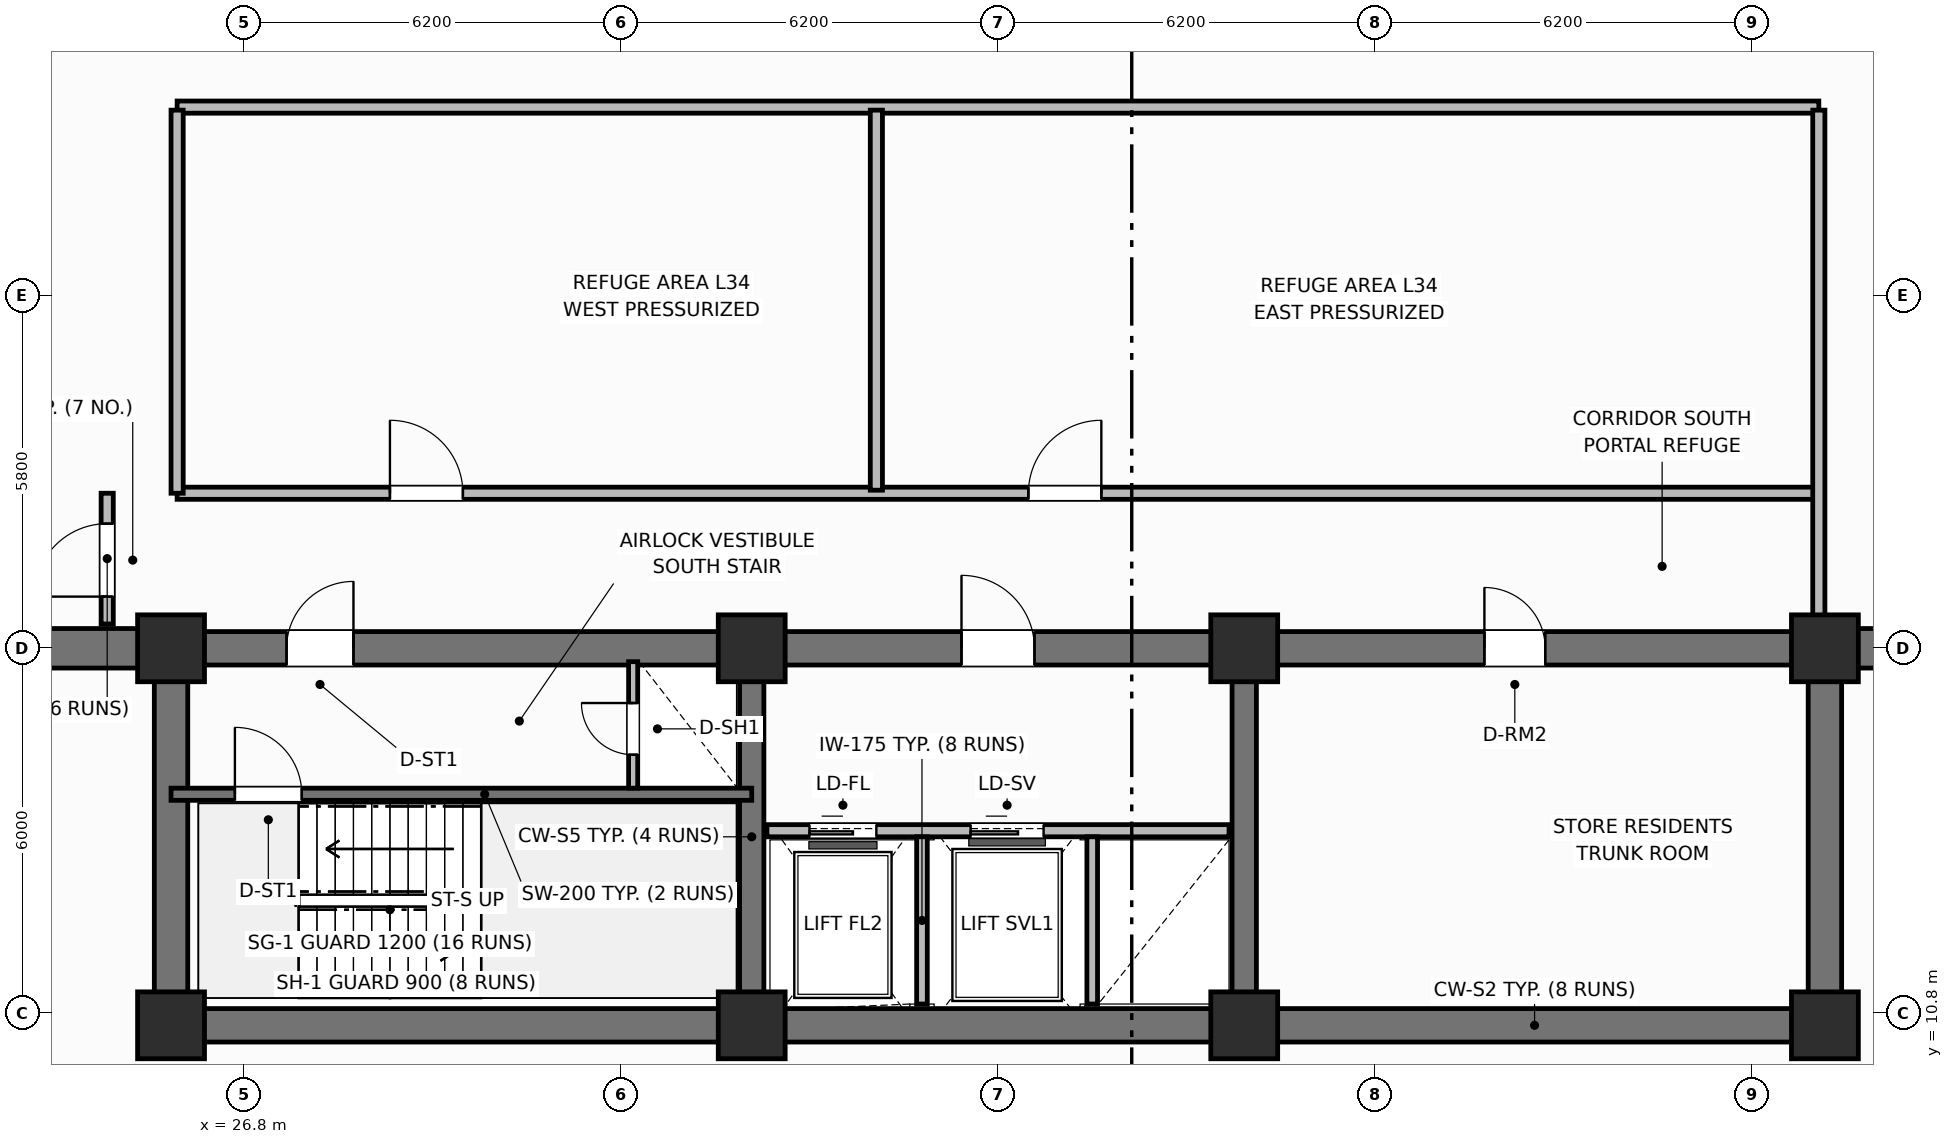
"""IFC4 building model, lengths in metres.
Left out: names, types, materials, properties, quantities, classifications, styles, units other than length and angle.
Written with IfcOpenShell. Run it as: python <this file> out.ifc"""

import sys

from ifc_helpers import new_model, si_unit, direction, frame, frame_2d, origin, origin_2d, place, context, subcontext, project, spatial, rectangle, extrude, element, fill, save


model = new_model("IFC4")
c1 = context("Model", 3, precision=1e-05, world=origin(), true_north=direction((0.0, 1.0)))
c2 = subcontext(c1, "Body", "Model", "MODEL_VIEW")
j1 = project(units=[si_unit("LENGTHUNIT", "METRE"), si_unit("PLANEANGLEUNIT", "RADIAN")], contexts=[c1])
p1 = place(None, origin())
s1 = spatial("IfcSite", under=j1, at=p1, CompositionType="ELEMENT")
p2 = place(p1, origin())
s2 = spatial("IfcBuilding", under=s1, at=p2, CompositionType="ELEMENT")
p3 = place(p2, frame((0.0, 0.0, 136.4)))
s3 = spatial("IfcBuildingStorey", under=s2, at=p3, CompositionType="ELEMENT", Elevation=136.4)
p4 = place(p3, frame((52.8, 10.6, 0.0), z_axis=(0.0, 0.0, 1.0), x_axis=(-1.0, 0.0, 0.0)))
e1 = element("IfcWall", 1, at=p4, inside=s3, PredefinedType="SHEAR", context=c2, shape_type="SweptSolid", body=[
    extrude(rectangle(XDim=27.2, YDim=0.55, at=frame_2d((13.6, 0.0))), origin(), (0.0, 0.0, 1.0), 7.2),
])
for number, where, z_axis, x_axis in (
    (2, (25.6, 10.875, 0.0), (0.0, 0.0, 1.0), (0.0, 1.0, 0.0)),
    (3, (52.8, 10.875, 0.0), (0.0, 0.0, 1.0), (0.0, 1.0, 0.0)),
):
    element("IfcWall", number, at=place(p3, frame(where, z_axis=z_axis, x_axis=x_axis)), inside=s3, PredefinedType="SHEAR", context=c2, shape_type="SweptSolid", body=[
        extrude(rectangle(XDim=5.65, YDim=0.55, at=frame_2d((2.825, 0.0))), origin(), (0.0, 0.0, 1.0), 7.2),
    ])
p5 = place(p3, frame((25.6, 16.8, 0.0), z_axis=(0.0, 0.0, 1.0), x_axis=(1.0, 0.0, 0.0)))
e4 = element("IfcWall", 4, at=p5, inside=s3, PredefinedType="SHEAR", context=c2, shape_type="SweptSolid", body=[
    extrude(rectangle(XDim=27.2, YDim=0.55, at=frame_2d((13.6, 0.0))), origin(), (0.0, 0.0, 1.0), 7.2),
])
p6 = place(p5, frame((1.9, 0.0, 0.0)))
e5 = element("IfcOpeningElement", 5, at=p6, cuts=e4, PredefinedType="OPENING", context=c2, shape_type="SweptSolid", body=[
    extrude(rectangle(XDim=1.1, YDim=2.15, at=frame_2d((0.55, 1.075))), frame((0.0, 0.285, 0.0), z_axis=(0.0, -1.0, 0.0), x_axis=(1.0, 0.0, 0.0)), (0.0, 0.0, 1.0), 0.57),
])
p7 = place(p5, frame((13.0, 0.0, 0.0)))
e6 = element("IfcOpeningElement", 6, at=p7, cuts=e4, PredefinedType="OPENING", context=c2, shape_type="SweptSolid", body=[
    extrude(rectangle(XDim=1.2, YDim=2.15, at=frame_2d((0.6, 1.075))), frame((0.0, 0.285, 0.0), z_axis=(0.0, -1.0, 0.0), x_axis=(1.0, 0.0, 0.0)), (0.0, 0.0, 1.0), 0.57),
])
p8 = place(p5, frame((21.6, 0.0, 0.0)))
e7 = element("IfcOpeningElement", 7, at=p8, cuts=e4, PredefinedType="OPENING", context=c2, shape_type="SweptSolid", body=[
    extrude(rectangle(XDim=1.0, YDim=2.15, at=frame_2d((0.5, 1.075))), frame((0.0, 0.285, 0.0), z_axis=(0.0, -1.0, 0.0), x_axis=(1.0, 0.0, 0.0)), (0.0, 0.0, 1.0), 0.57),
])
for number, where, z_axis, x_axis in (
    (8, (35.15, 10.875, 0.0), (0.0, 0.0, 1.0), (0.0, 1.0, 0.0)),
    (9, (43.25, 10.875, 0.0), (0.0, 0.0, 1.0), (0.0, 1.0, 0.0)),
):
    element("IfcWall", number, at=place(p3, frame(where, z_axis=z_axis, x_axis=x_axis)), inside=s3, PredefinedType="SHEAR", context=c2, shape_type="SweptSolid", body=[
        extrude(rectangle(XDim=5.65, YDim=0.4, at=frame_2d((2.825, 0.0))), origin(), (0.0, 0.0, 1.0), 7.2),
    ])
for number, where, z_axis, x_axis in (
    (10, (25.6, 10.6, 0.0), (0.0, 0.0, 1.0), (1.0, 0.0, 0.0)),
    (11, (25.6, 16.8, 0.0), (0.0, 0.0, 1.0), (1.0, 0.0, 0.0)),
    (12, (35.15, 10.6, 0.0), (0.0, 0.0, 1.0), (1.0, 0.0, 0.0)),
    (13, (35.15, 16.8, 0.0), (0.0, 0.0, 1.0), (1.0, 0.0, 0.0)),
    (14, (43.25, 10.6, 0.0), (0.0, 0.0, 1.0), (1.0, 0.0, 0.0)),
    (15, (43.25, 16.8, 0.0), (0.0, 0.0, 1.0), (1.0, 0.0, 0.0)),
    (16, (52.8, 10.6, 0.0), (0.0, 0.0, 1.0), (1.0, 0.0, 0.0)),
    (17, (52.8, 16.8, 0.0), (0.0, 0.0, 1.0), (1.0, 0.0, 0.0)),
):
    element("IfcColumn", number, at=place(p3, frame(where, z_axis=z_axis, x_axis=x_axis)), inside=s3, PredefinedType="COLUMN", context=c2, shape_type="SweptSolid", body=[
        extrude(rectangle(XDim=1.1, YDim=1.1, at=origin_2d()), origin(), (0.0, 0.0, 1.0), 7.2),
    ])
for number, where, z_axis, x_axis in (
    (18, (15.05, 16.8, 0.0), (0.0, 0.0, 1.0), (1.0, 0.0, 0.0)),
    (19, (52.8, 16.8, 0.0), (0.0, 0.0, 1.0), (1.0, 0.0, 0.0)),
):
    element("IfcWall", number, at=place(p3, frame(where, z_axis=z_axis, x_axis=x_axis)), inside=s3, PredefinedType="SHEAR", context=c2, shape_type="SweptSolid", body=[
        extrude(rectangle(XDim=10.55, YDim=0.65, at=frame_2d((5.275, 0.0))), origin(), (0.0, 0.0, 1.0), 6.8),
    ])
p9 = place(p3, frame((25.6, 14.4, 0.0), z_axis=(0.0, 0.0, 1.0), x_axis=(1.0, 0.0, 0.0)))
e20 = element("IfcWall", 20, at=p9, inside=s3, PredefinedType="SHEAR", context=c2, shape_type="SweptSolid", body=[
    extrude(rectangle(XDim=9.55, YDim=0.2, at=frame_2d((4.775, 0.0))), origin(), (0.0, 0.0, 1.0), 7.2),
])
p10 = place(p9, frame((1.05, 0.0, 0.0)))
e21 = element("IfcOpeningElement", 21, at=p10, cuts=e20, PredefinedType="OPENING", context=c2, shape_type="SweptSolid", body=[
    extrude(rectangle(XDim=1.1, YDim=2.15, at=frame_2d((0.55, 1.075))), frame((0.0, 0.11, 0.0), z_axis=(0.0, -1.0, 0.0), x_axis=(1.0, 0.0, 0.0)), (0.0, 0.0, 1.0), 0.22),
])
p11 = place(p3, frame((33.2, 14.5, 0.0), z_axis=(0.0, 0.0, 1.0), x_axis=(0.0, 1.0, 0.0)))
e22 = element("IfcWall", 22, at=p11, inside=s3, PredefinedType="PARTITIONING", context=c2, shape_type="SweptSolid", body=[
    extrude(rectangle(XDim=2.08, YDim=0.15, at=frame_2d((1.04, 0.0))), origin(), (0.0, 0.0, 1.0), 4.96),
])
p12 = place(p11, frame((0.55, 0.0, 0.0)))
e23 = element("IfcOpeningElement", 23, at=p12, cuts=e22, PredefinedType="OPENING", context=c2, shape_type="SweptSolid", body=[
    extrude(rectangle(XDim=0.85, YDim=2.05, at=frame_2d((0.425, 1.025))), frame((0.0, 0.085, 0.0), z_axis=(0.0, -1.0, 0.0), x_axis=(1.0, 0.0, 0.0)), (0.0, 0.0, 1.0), 0.17),
])
p13 = place(p3, frame((35.4, 13.8, 0.0), z_axis=(0.0, 0.0, 1.0), x_axis=(1.0, 0.0, 0.0)))
e24 = element("IfcWall", 24, at=p13, inside=s3, PredefinedType="PARTITIONING", context=c2, shape_type="SweptSolid", body=[
    extrude(rectangle(XDim=7.6, YDim=0.2, at=frame_2d((3.8, 0.0))), origin(), (0.0, 0.0, 1.0), 4.96),
])
p14 = place(p13, frame((0.7, 0.0, 0.0)))
e25 = element("IfcOpeningElement", 25, at=p14, cuts=e24, PredefinedType="OPENING", context=c2, shape_type="SweptSolid", body=[
    extrude(rectangle(XDim=1.1, YDim=2.15, at=frame_2d((0.55, 1.075))), frame((0.0, 0.11, 0.0), z_axis=(0.0, -1.0, 0.0), x_axis=(1.0, 0.0, 0.0)), (0.0, 0.0, 1.0), 0.22),
])
p15 = place(p13, frame((3.35, 0.0, 0.0)))
e26 = element("IfcOpeningElement", 26, at=p15, cuts=e24, PredefinedType="OPENING", context=c2, shape_type="SweptSolid", body=[
    extrude(rectangle(XDim=1.2, YDim=2.15, at=frame_2d((0.6, 1.075))), frame((0.0, 0.11, 0.0), z_axis=(0.0, -1.0, 0.0), x_axis=(1.0, 0.0, 0.0)), (0.0, 0.0, 1.0), 0.22),
])
for number, where, z_axis, x_axis in (
    (27, (37.95, 10.95, 0.0), (0.0, 0.0, 1.0), (0.0, 1.0, 0.0)),
    (28, (40.75, 10.95, 0.0), (0.0, 0.0, 1.0), (0.0, 1.0, 0.0)),
):
    element("IfcWall", number, at=place(p3, frame(where, z_axis=z_axis, x_axis=x_axis)), inside=s3, PredefinedType="PARTITIONING", context=c2, shape_type="SweptSolid", body=[
        extrude(rectangle(XDim=2.75, YDim=0.175, at=frame_2d((1.375, 0.0))), origin(), (0.0, 0.0, 1.0), 4.96),
    ])
p16 = place(p3, frame((25.7, 19.35, 0.0), z_axis=(0.0, 0.0, 1.0), x_axis=(1.0, 0.0, 0.0)))
e29 = element("IfcWall", 29, at=p16, inside=s3, PredefinedType="PARTITIONING", context=c2, shape_type="SweptSolid", body=[
    extrude(rectangle(XDim=27.0, YDim=0.2, at=frame_2d((13.5, 0.0))), origin(), (0.0, 0.0, 1.0), 4.96),
])
p17 = place(p16, frame((3.5, 0.0, 0.0)))
e30 = element("IfcOpeningElement", 30, at=p17, cuts=e29, PredefinedType="OPENING", context=c2, shape_type="SweptSolid", body=[
    extrude(rectangle(XDim=1.2, YDim=2.15, at=frame_2d((0.6, 1.075))), frame((0.0, 0.11, 0.0), z_axis=(0.0, -1.0, 0.0), x_axis=(1.0, 0.0, 0.0)), (0.0, 0.0, 1.0), 0.22),
])
p18 = place(p16, frame((14.0, 0.0, 0.0)))
e31 = element("IfcOpeningElement", 31, at=p18, cuts=e29, PredefinedType="OPENING", context=c2, shape_type="SweptSolid", body=[
    extrude(rectangle(XDim=1.2, YDim=2.15, at=frame_2d((0.6, 1.075))), frame((0.0, 0.11, 0.0), z_axis=(0.0, -1.0, 0.0), x_axis=(1.0, 0.0, 0.0)), (0.0, 0.0, 1.0), 0.22),
])
p19 = place(p3, frame((25.7, 25.7, 0.0), z_axis=(0.0, 0.0, 1.0), x_axis=(1.0, 0.0, 0.0)))
e32 = element("IfcWall", 32, at=p19, inside=s3, PredefinedType="PARTITIONING", context=c2, shape_type="SweptSolid", body=[
    extrude(rectangle(XDim=27.0, YDim=0.2, at=frame_2d((13.5, 0.0))), origin(), (0.0, 0.0, 1.0), 4.96),
])
p20 = place(p3, frame((37.2, 19.4, 0.0), z_axis=(0.0, 0.0, 1.0), x_axis=(0.0, 1.0, 0.0)))
e33 = element("IfcWall", 33, at=p20, inside=s3, PredefinedType="PARTITIONING", context=c2, shape_type="SweptSolid", body=[
    extrude(rectangle(XDim=6.25, YDim=0.2, at=frame_2d((3.125, 0.0))), origin(), (0.0, 0.0, 1.0), 4.96),
])
p21 = place(p3, frame((24.55, 17.2, 0.0), z_axis=(0.0, 0.0, 1.0), x_axis=(0.0, 1.0, 0.0)))
e34 = element("IfcWall", 34, at=p21, inside=s3, PredefinedType="PARTITIONING", context=c2, shape_type="SweptSolid", body=[
    extrude(rectangle(XDim=2.15, YDim=0.2, at=frame_2d((1.075, 0.0))), origin(), (0.0, 0.0, 1.0), 4.96),
])
p22 = place(p21, frame((0.45, 0.0, 0.0)))
e35 = element("IfcOpeningElement", 35, at=p22, cuts=e34, PredefinedType="OPENING", context=c2, shape_type="SweptSolid", body=[
    extrude(rectangle(XDim=1.2, YDim=2.15, at=frame_2d((0.6, 1.075))), frame((0.0, 0.11, 0.0), z_axis=(0.0, -1.0, 0.0), x_axis=(1.0, 0.0, 0.0)), (0.0, 0.0, 1.0), 0.22),
])
p23 = place(p3, frame((25.7, 19.35, 0.0), z_axis=(0.0, 0.0, 1.0), x_axis=(0.0, 1.0, 0.0)))
e36 = element("IfcWall", 36, at=p23, inside=s3, PredefinedType="PARTITIONING", context=c2, shape_type="SweptSolid", body=[
    extrude(rectangle(XDim=6.3, YDim=0.2, at=frame_2d((3.15, 0.0))), origin(), (0.0, 0.0, 1.0), 4.96),
])
p24 = place(p3, frame((52.7, 17.2, 0.0), z_axis=(0.0, 0.0, 1.0), x_axis=(0.0, 1.0, 0.0)))
e37 = element("IfcWall", 37, at=p24, inside=s3, PredefinedType="PARTITIONING", context=c2, shape_type="SweptSolid", body=[
    extrude(rectangle(XDim=8.45, YDim=0.2, at=frame_2d((4.225, 0.0))), origin(), (0.0, 0.0, 1.0), 4.96),
])
p25 = place(p10, origin())
e38 = element("IfcDoor", 38, at=p25, inside=s3, OperationType="SINGLE_SWING_LEFT", PredefinedType="DOOR", context=c2, shape_type="SweptSolid", body=[
    extrude(rectangle(XDim=1.1, YDim=2.15, at=frame_2d((0.55, 1.075))), frame((0.0, 0.025, 0.0), z_axis=(0.0, -1.0, 0.0), x_axis=(1.0, 0.0, 0.0)), (0.0, 0.0, 1.0), 0.05),
])
fill(e21, e38)
p26 = place(p12, origin())
e39 = element("IfcDoor", 39, at=p26, inside=s3, OperationType="SINGLE_SWING_RIGHT", PredefinedType="TRAPDOOR", context=c2, shape_type="SweptSolid", body=[
    extrude(rectangle(XDim=0.85, YDim=2.05, at=frame_2d((0.425, 1.025))), frame((0.0, 0.025, 0.0), z_axis=(0.0, -1.0, 0.0), x_axis=(1.0, 0.0, 0.0)), (0.0, 0.0, 1.0), 0.05),
])
fill(e23, e39)
p27 = place(p14, origin())
e40 = element("IfcDoor", 40, at=p27, inside=s3, OperationType="SLIDING_TO_LEFT", PredefinedType="DOOR", context=c2, shape_type="SweptSolid", body=[
    extrude(rectangle(XDim=1.1, YDim=2.15, at=frame_2d((0.55, 1.075))), frame((0.0, 0.025, 0.0), z_axis=(0.0, -1.0, 0.0), x_axis=(1.0, 0.0, 0.0)), (0.0, 0.0, 1.0), 0.05),
])
fill(e25, e40)
p28 = place(p15, origin())
e41 = element("IfcDoor", 41, at=p28, inside=s3, OperationType="SLIDING_TO_LEFT", PredefinedType="DOOR", context=c2, shape_type="SweptSolid", body=[
    extrude(rectangle(XDim=1.2, YDim=2.15, at=frame_2d((0.6, 1.075))), frame((0.0, 0.025, 0.0), z_axis=(0.0, -1.0, 0.0), x_axis=(1.0, 0.0, 0.0)), (0.0, 0.0, 1.0), 0.05),
])
fill(e26, e41)
p29 = place(p17, origin())
e42 = element("IfcDoor", 42, at=p29, inside=s3, OperationType="SINGLE_SWING_LEFT", PredefinedType="DOOR", context=c2, shape_type="SweptSolid", body=[
    extrude(rectangle(XDim=1.2, YDim=2.15, at=frame_2d((0.6, 1.075))), frame((0.0, 0.025, 0.0), z_axis=(0.0, -1.0, 0.0), x_axis=(1.0, 0.0, 0.0)), (0.0, 0.0, 1.0), 0.05),
])
fill(e30, e42)
p30 = place(p18, origin())
e43 = element("IfcDoor", 43, at=p30, inside=s3, OperationType="SINGLE_SWING_RIGHT", PredefinedType="DOOR", context=c2, shape_type="SweptSolid", body=[
    extrude(rectangle(XDim=1.2, YDim=2.15, at=frame_2d((0.6, 1.075))), frame((0.0, 0.025, 0.0), z_axis=(0.0, -1.0, 0.0), x_axis=(1.0, 0.0, 0.0)), (0.0, 0.0, 1.0), 0.05),
])
fill(e31, e43)
p31 = place(p22, origin())
e44 = element("IfcDoor", 44, at=p31, inside=s3, OperationType="SINGLE_SWING_LEFT", PredefinedType="DOOR", context=c2, shape_type="SweptSolid", body=[
    extrude(rectangle(XDim=1.2, YDim=2.15, at=frame_2d((0.6, 1.075))), frame((0.0, 0.025, 0.0), z_axis=(0.0, -1.0, 0.0), x_axis=(1.0, 0.0, 0.0)), (0.0, 0.0, 1.0), 0.05),
])
fill(e35, e44)
p32 = place(p6, origin())
e45 = element("IfcDoor", 45, at=p32, inside=s3, OperationType="SINGLE_SWING_RIGHT", PredefinedType="DOOR", context=c2, shape_type="SweptSolid", body=[
    extrude(rectangle(XDim=1.1, YDim=2.15, at=frame_2d((0.55, 1.075))), frame((0.0, 0.025, 0.0), z_axis=(0.0, -1.0, 0.0), x_axis=(1.0, 0.0, 0.0)), (0.0, 0.0, 1.0), 0.05),
])
fill(e5, e45)
p33 = place(p7, origin())
e46 = element("IfcDoor", 46, at=p33, inside=s3, OperationType="SINGLE_SWING_LEFT", PredefinedType="DOOR", context=c2, shape_type="SweptSolid", body=[
    extrude(rectangle(XDim=1.2, YDim=2.15, at=frame_2d((0.6, 1.075))), frame((0.0, 0.025, 0.0), z_axis=(0.0, -1.0, 0.0), x_axis=(1.0, 0.0, 0.0)), (0.0, 0.0, 1.0), 0.05),
])
fill(e6, e46)
p34 = place(p8, origin())
e47 = element("IfcDoor", 47, at=p34, inside=s3, OperationType="SINGLE_SWING_LEFT", PredefinedType="DOOR", context=c2, shape_type="SweptSolid", body=[
    extrude(rectangle(XDim=1.0, YDim=2.15, at=frame_2d((0.5, 1.075))), frame((0.0, 0.025, 0.0), z_axis=(0.0, -1.0, 0.0), x_axis=(1.0, 0.0, 0.0)), (0.0, 0.0, 1.0), 0.05),
])
fill(e7, e47)
save(model, sys.argv[1])
